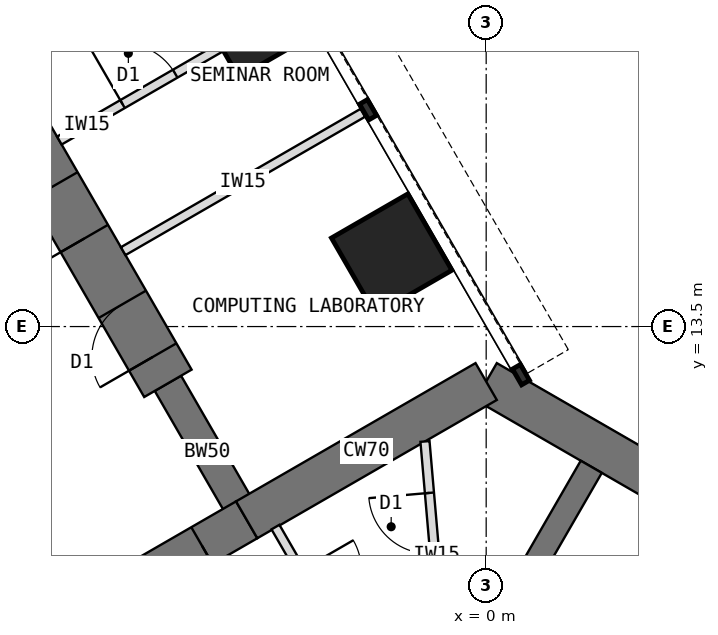
"""IFC4 building model, lengths in metres.
Left out: names, types, materials, properties, quantities, classifications, styles, units other than length and angle.
Written with IfcOpenShell. Run it as: python <this file> out.ifc"""

import sys

from ifc_helpers import new_model, si_unit, direction, frame, frame_2d, origin, origin_2d, place, context, subcontext, project, spatial, rectangle, extrude, element, fill, save


model = new_model("IFC4")
c1 = context("Model", 3, precision=1e-05, world=origin(), true_north=direction((0.0, 1.0)))
c2 = subcontext(c1, "Body", "Model", "MODEL_VIEW")
j1 = project(units=[si_unit("LENGTHUNIT", "METRE"), si_unit("PLANEANGLEUNIT", "RADIAN")], contexts=[c1])
p1 = place(None, origin())
s1 = spatial("IfcSite", under=j1, at=p1, CompositionType="ELEMENT")
p2 = place(p1, origin())
s2 = spatial("IfcBuilding", under=s1, at=p2, CompositionType="ELEMENT")
p3 = place(p2, frame((0.0, 0.0, 68.5)))
s3 = spatial("IfcBuildingStorey", under=s2, at=p3, CompositionType="ELEMENT", Elevation=68.5)
p4 = place(p3, frame((10.908, 6.298, 0.0), z_axis=(0.0, 0.0, 1.0), x_axis=(-0.866021940709, 0.500005998175, 0.0)))
e1 = element("IfcWall", 1, at=p4, inside=s3, PredefinedType="SHEAR", context=c2, shape_type="SweptSolid", body=[
    extrude(rectangle(XDim=12.596, YDim=0.7, at=frame_2d((6.298, 0.0))), origin(), (0.0, 0.0, 1.0), 4.0),
])
p5 = place(p3, frame((0.0, 12.596, 0.0), z_axis=(0.0, 0.0, 1.0), x_axis=(-0.866011268655, -0.500024481964, 0.0)))
e2 = element("IfcWall", 2, at=p5, inside=s3, PredefinedType="SHEAR", context=c2, shape_type="SweptSolid", body=[
    extrude(rectangle(XDim=4.548, YDim=0.7, at=frame_2d((2.274, 0.0))), origin(), (0.0, 0.0, 1.0), 4.0),
])
p6 = place(p3, frame((-3.939, 10.322, 0.0), z_axis=(0.0, 0.0, 1.0), x_axis=(-0.866019471182, -0.500010275428, 0.0)))
e3 = element("IfcWall", 3, at=p6, inside=s3, PredefinedType="SHEAR", context=c2, shape_type="SweptSolid", body=[
    extrude(rectangle(XDim=3.5, YDim=0.7, at=frame_2d((1.75, 0.0))), origin(), (0.0, 0.0, 1.0), 4.0),
])
p7 = place(p6, frame((0.85, 0.0, 0.0)))
e4 = element("IfcOpeningElement", 4, at=p7, cuts=e3, PredefinedType="OPENING", context=c2, shape_type="SweptSolid", body=[
    extrude(rectangle(XDim=1.8, YDim=2.1, at=frame_2d((0.9, 1.05))), frame((0.0, 0.36, 0.0), z_axis=(0.0, -1.0, 0.0), x_axis=(1.0, 0.0, 0.0)), (0.0, 0.0, 1.0), 0.72),
])
for number, where, z_axis, x_axis in (
    (5, (-6.97, 8.572, 0.0), (0.0, 0.0, 1.0), (-0.5, 0.866, 0.0)),
    (6, (-3.939, 10.322, 0.0), (0.0, 0.0, 1.0), (-0.5, 0.866, 0.0)),
):
    element("IfcWall", number, at=place(p3, frame(where, z_axis=z_axis, x_axis=x_axis)), inside=s3, PredefinedType="SHEAR", context=c2, shape_type="SweptSolid", body=[
        extrude(rectangle(XDim=2.592, YDim=0.5, at=frame_2d((1.296, 0.0))), origin(), (0.0, 0.0, 1.0), 4.0),
    ])
p8 = place(p3, frame((-5.234, 12.566, 0.0), z_axis=(0.0, 0.0, 1.0), x_axis=(-0.500010103361, 0.866019570528, 0.0)))
e7 = element("IfcWall", 7, at=p8, inside=s3, PredefinedType="SHEAR", context=c2, shape_type="SweptSolid", body=[
    extrude(rectangle(XDim=13.2, YDim=0.9, at=frame_2d((6.6, 0.0))), origin(), (0.0, 0.0, 1.0), 4.0),
])
p9 = place(p8, frame((0.5, 0.0, 0.0)))
e8 = element("IfcOpeningElement", 8, at=p9, cuts=e7, PredefinedType="OPENING", context=c2, shape_type="SweptSolid", body=[
    extrude(rectangle(XDim=1.0, YDim=2.1, at=frame_2d((0.5, 1.05))), frame((0.0, 0.46, 0.0), z_axis=(0.0, -1.0, 0.0), x_axis=(1.0, 0.0, 0.0)), (0.0, 0.0, 1.0), 0.92),
])
p10 = place(p8, frame((2.75, 0.0, 0.0)))
e9 = element("IfcOpeningElement", 9, at=p10, cuts=e7, PredefinedType="OPENING", context=c2, shape_type="SweptSolid", body=[
    extrude(rectangle(XDim=1.0, YDim=2.1, at=frame_2d((0.5, 1.05))), frame((0.0, 0.46, 0.0), z_axis=(0.0, -1.0, 0.0), x_axis=(1.0, 0.0, 0.0)), (0.0, 0.0, 1.0), 0.92),
])
p11 = place(p8, frame((7.25, 0.0, 0.0)))
e10 = element("IfcOpeningElement", 10, at=p11, cuts=e7, PredefinedType="OPENING", context=c2, shape_type="SweptSolid", body=[
    extrude(rectangle(XDim=1.0, YDim=2.1, at=frame_2d((0.5, 1.05))), frame((0.0, 0.46, 0.0), z_axis=(0.0, -1.0, 0.0), x_axis=(1.0, 0.0, 0.0)), (0.0, 0.0, 1.0), 0.92),
])
for number, where, z_axis, x_axis in (
    (11, (-1.554, 14.691, 0.0), (0.0, 0.0, 1.0), (0.866, 0.5, 0.0)),
    (12, (-3.804, 18.588, 0.0), (0.0, 0.0, 1.0), (0.866, 0.5, 0.0)),
):
    element("IfcColumn", number, at=place(p3, frame(where, z_axis=z_axis, x_axis=x_axis)), inside=s3, PredefinedType="COLUMN", context=c2, shape_type="SweptSolid", body=[
        extrude(rectangle(XDim=1.45, YDim=1.45, at=origin_2d()), origin(), (0.0, 0.0, 1.0), 4.0),
    ])
p12 = place(p3, frame((-1.201, 6.12, 0.0), z_axis=(0.0, 0.0, 1.0), x_axis=(0.500002627198, 0.866023886965, 0.0)))
e13 = element("IfcWall", 13, at=p12, inside=s3, PredefinedType="SHEAR", context=c2, shape_type="SweptSolid", body=[
    extrude(rectangle(XDim=5.858, YDim=0.4, at=frame_2d((2.929, 0.0))), origin(), (0.0, 0.0, 1.0), 4.0),
])
p13 = place(p3, frame((-5.97, 14.74, 0.0), z_axis=(0.0, 0.0, 1.0), x_axis=(0.866035472144, 0.499982560684, 0.0)))
e14 = element("IfcWall", 14, at=p13, inside=s3, PredefinedType="PARTITIONING", context=c2, shape_type="SweptSolid", body=[
    extrude(rectangle(XDim=4.55, YDim=0.15, at=frame_2d((2.275, 0.0))), origin(), (0.0, 0.0, 1.0), 3.8),
])
p14 = place(p3, frame((-7.02, 16.559, 0.0), z_axis=(0.0, 0.0, 1.0), x_axis=(0.866038511948, 0.499977295307, 0.0)))
e15 = element("IfcWall", 15, at=p14, inside=s3, PredefinedType="PARTITIONING", context=c2, shape_type="SweptSolid", body=[
    extrude(rectangle(XDim=3.4, YDim=0.15, at=frame_2d((1.7, 0.0))), origin(), (0.0, 0.0, 1.0), 3.8),
])
p15 = place(p14, frame((1.2, 0.0, 0.0)))
e16 = element("IfcOpeningElement", 16, at=p15, cuts=e15, PredefinedType="OPENING", context=c2, shape_type="SweptSolid", body=[
    extrude(rectangle(XDim=1.0, YDim=2.1, at=frame_2d((0.5, 1.05))), frame((0.0, 0.085, 0.0), z_axis=(0.0, -1.0, 0.0), x_axis=(1.0, 0.0, 0.0)), (0.0, 0.0, 1.0), 0.17),
])
p16 = place(p3, frame((-3.466, 10.202, 0.0), z_axis=(0.0, 0.0, 1.0), x_axis=(0.500007369519, -0.866021148949, 0.0)))
e17 = element("IfcWall", 17, at=p16, inside=s3, PredefinedType="PARTITIONING", context=c2, shape_type="SweptSolid", body=[
    extrude(rectangle(XDim=4.426, YDim=0.15, at=frame_2d((2.213, 0.0))), origin(), (0.0, 0.0, 1.0), 3.8),
])
p17 = place(p16, frame((0.828, 0.0, 0.0)))
e18 = element("IfcOpeningElement", 18, at=p17, cuts=e17, PredefinedType="OPENING", context=c2, shape_type="SweptSolid", body=[
    extrude(rectangle(XDim=1.0, YDim=2.1, at=frame_2d((0.5, 1.05))), frame((0.0, 0.085, 0.0), z_axis=(0.0, -1.0, 0.0), x_axis=(1.0, 0.0, 0.0)), (0.0, 0.0, 1.0), 0.17),
])
p18 = place(p3, frame((-0.618, 7.129, 0.0), z_axis=(0.0, 0.0, 1.0), x_axis=(-0.086409450071, 0.996259708579, 0.0)))
e19 = element("IfcWall", 19, at=p18, inside=s3, PredefinedType="PARTITIONING", context=c2, shape_type="SweptSolid", body=[
    extrude(rectangle(XDim=4.498, YDim=0.15, at=frame_2d((2.249, 0.0))), origin(), (0.0, 0.0, 1.0), 3.8),
])
p19 = place(p18, frame((2.648, 0.0, 0.0)))
e20 = element("IfcOpeningElement", 20, at=p19, cuts=e19, PredefinedType="OPENING", context=c2, shape_type="SweptSolid", body=[
    extrude(rectangle(XDim=1.0, YDim=2.1, at=frame_2d((0.5, 1.05))), frame((0.0, 0.085, 0.0), z_axis=(0.0, -1.0, 0.0), x_axis=(1.0, 0.0, 0.0)), (0.0, 0.0, 1.0), 0.17),
])
p20 = place(p7, origin())
e21 = element("IfcDoor", 21, at=p20, inside=s3, OperationType="DOUBLE_DOOR_DOUBLE_SWING", PredefinedType="DOOR", context=c2, shape_type="SweptSolid", body=[
    extrude(rectangle(XDim=1.72, YDim=2.06, at=frame_2d((0.9, 1.03))), frame((0.0, 0.025, 0.0), z_axis=(0.0, -1.0, 0.0), x_axis=(1.0, 0.0, 0.0)), (0.0, 0.0, 1.0), 0.05),
    extrude(rectangle(XDim=0.04, YDim=2.1, at=frame_2d((0.02, 1.05))), frame((0.0, 0.35, 0.0), z_axis=(0.0, -1.0, 0.0), x_axis=(1.0, 0.0, 0.0)), (0.0, 0.0, 1.0), 0.699),
    extrude(rectangle(XDim=0.04, YDim=2.1, at=frame_2d((1.78, 1.05))), frame((0.0, 0.35, 0.0), z_axis=(0.0, -1.0, 0.0), x_axis=(1.0, 0.0, 0.0)), (0.0, 0.0, 1.0), 0.699),
    extrude(rectangle(XDim=1.72, YDim=0.04, at=frame_2d((0.9, 2.08))), frame((0.0, 0.35, 0.0), z_axis=(0.0, -1.0, 0.0), x_axis=(1.0, 0.0, 0.0)), (0.0, 0.0, 1.0), 0.699),
])
fill(e4, e21)
p21 = place(p15, origin())
e22 = element("IfcDoor", 22, at=p21, inside=s3, OperationType="SINGLE_SWING_LEFT", PredefinedType="DOOR", context=c2, shape_type="SweptSolid", body=[
    extrude(rectangle(XDim=1.0, YDim=2.1, at=frame_2d((0.5, 1.05))), frame((0.0, 0.025, 0.0), z_axis=(0.0, -1.0, 0.0), x_axis=(1.0, 0.0, 0.0)), (0.0, 0.0, 1.0), 0.05),
])
fill(e16, e22)
p22 = place(p19, origin())
e23 = element("IfcDoor", 23, at=p22, inside=s3, OperationType="SINGLE_SWING_RIGHT", PredefinedType="DOOR", context=c2, shape_type="SweptSolid", body=[
    extrude(rectangle(XDim=1.0, YDim=2.1, at=frame_2d((0.5, 1.05))), frame((0.0, 0.025, 0.0), z_axis=(0.0, -1.0, 0.0), x_axis=(1.0, 0.0, 0.0)), (0.0, 0.0, 1.0), 0.05),
])
fill(e20, e23)
p23 = place(p9, origin())
e24 = element("IfcDoor", 24, at=p23, inside=s3, OperationType="SINGLE_SWING_LEFT", PredefinedType="DOOR", context=c2, shape_type="SweptSolid", body=[
    extrude(rectangle(XDim=0.92, YDim=2.06, at=frame_2d((0.5, 1.03))), frame((0.0, 0.025, 0.0), z_axis=(0.0, -1.0, 0.0), x_axis=(1.0, 0.0, 0.0)), (0.0, 0.0, 1.0), 0.05),
    extrude(rectangle(XDim=0.04, YDim=2.1, at=frame_2d((0.02, 1.05))), frame((0.0, 0.45, 0.0), z_axis=(0.0, -1.0, 0.0), x_axis=(1.0, 0.0, 0.0)), (0.0, 0.0, 1.0), 0.899),
    extrude(rectangle(XDim=0.04, YDim=2.1, at=frame_2d((0.98, 1.05))), frame((0.0, 0.45, 0.0), z_axis=(0.0, -1.0, 0.0), x_axis=(1.0, 0.0, 0.0)), (0.0, 0.0, 1.0), 0.899),
    extrude(rectangle(XDim=0.92, YDim=0.04, at=frame_2d((0.5, 2.08))), frame((0.0, 0.45, 0.0), z_axis=(0.0, -1.0, 0.0), x_axis=(1.0, 0.0, 0.0)), (0.0, 0.0, 1.0), 0.899),
])
fill(e8, e24)
p24 = place(p10, origin())
e25 = element("IfcDoor", 25, at=p24, inside=s3, OperationType="SINGLE_SWING_LEFT", PredefinedType="DOOR", context=c2, shape_type="SweptSolid", body=[
    extrude(rectangle(XDim=0.92, YDim=2.06, at=frame_2d((0.5, 1.03))), frame((0.0, 0.025, 0.0), z_axis=(0.0, -1.0, 0.0), x_axis=(1.0, 0.0, 0.0)), (0.0, 0.0, 1.0), 0.05),
    extrude(rectangle(XDim=0.04, YDim=2.1, at=frame_2d((0.02, 1.05))), frame((0.0, 0.45, 0.0), z_axis=(0.0, -1.0, 0.0), x_axis=(1.0, 0.0, 0.0)), (0.0, 0.0, 1.0), 0.899),
    extrude(rectangle(XDim=0.04, YDim=2.1, at=frame_2d((0.98, 1.05))), frame((0.0, 0.45, 0.0), z_axis=(0.0, -1.0, 0.0), x_axis=(1.0, 0.0, 0.0)), (0.0, 0.0, 1.0), 0.899),
    extrude(rectangle(XDim=0.92, YDim=0.04, at=frame_2d((0.5, 2.08))), frame((0.0, 0.45, 0.0), z_axis=(0.0, -1.0, 0.0), x_axis=(1.0, 0.0, 0.0)), (0.0, 0.0, 1.0), 0.899),
])
fill(e9, e25)
save(model, sys.argv[1])
